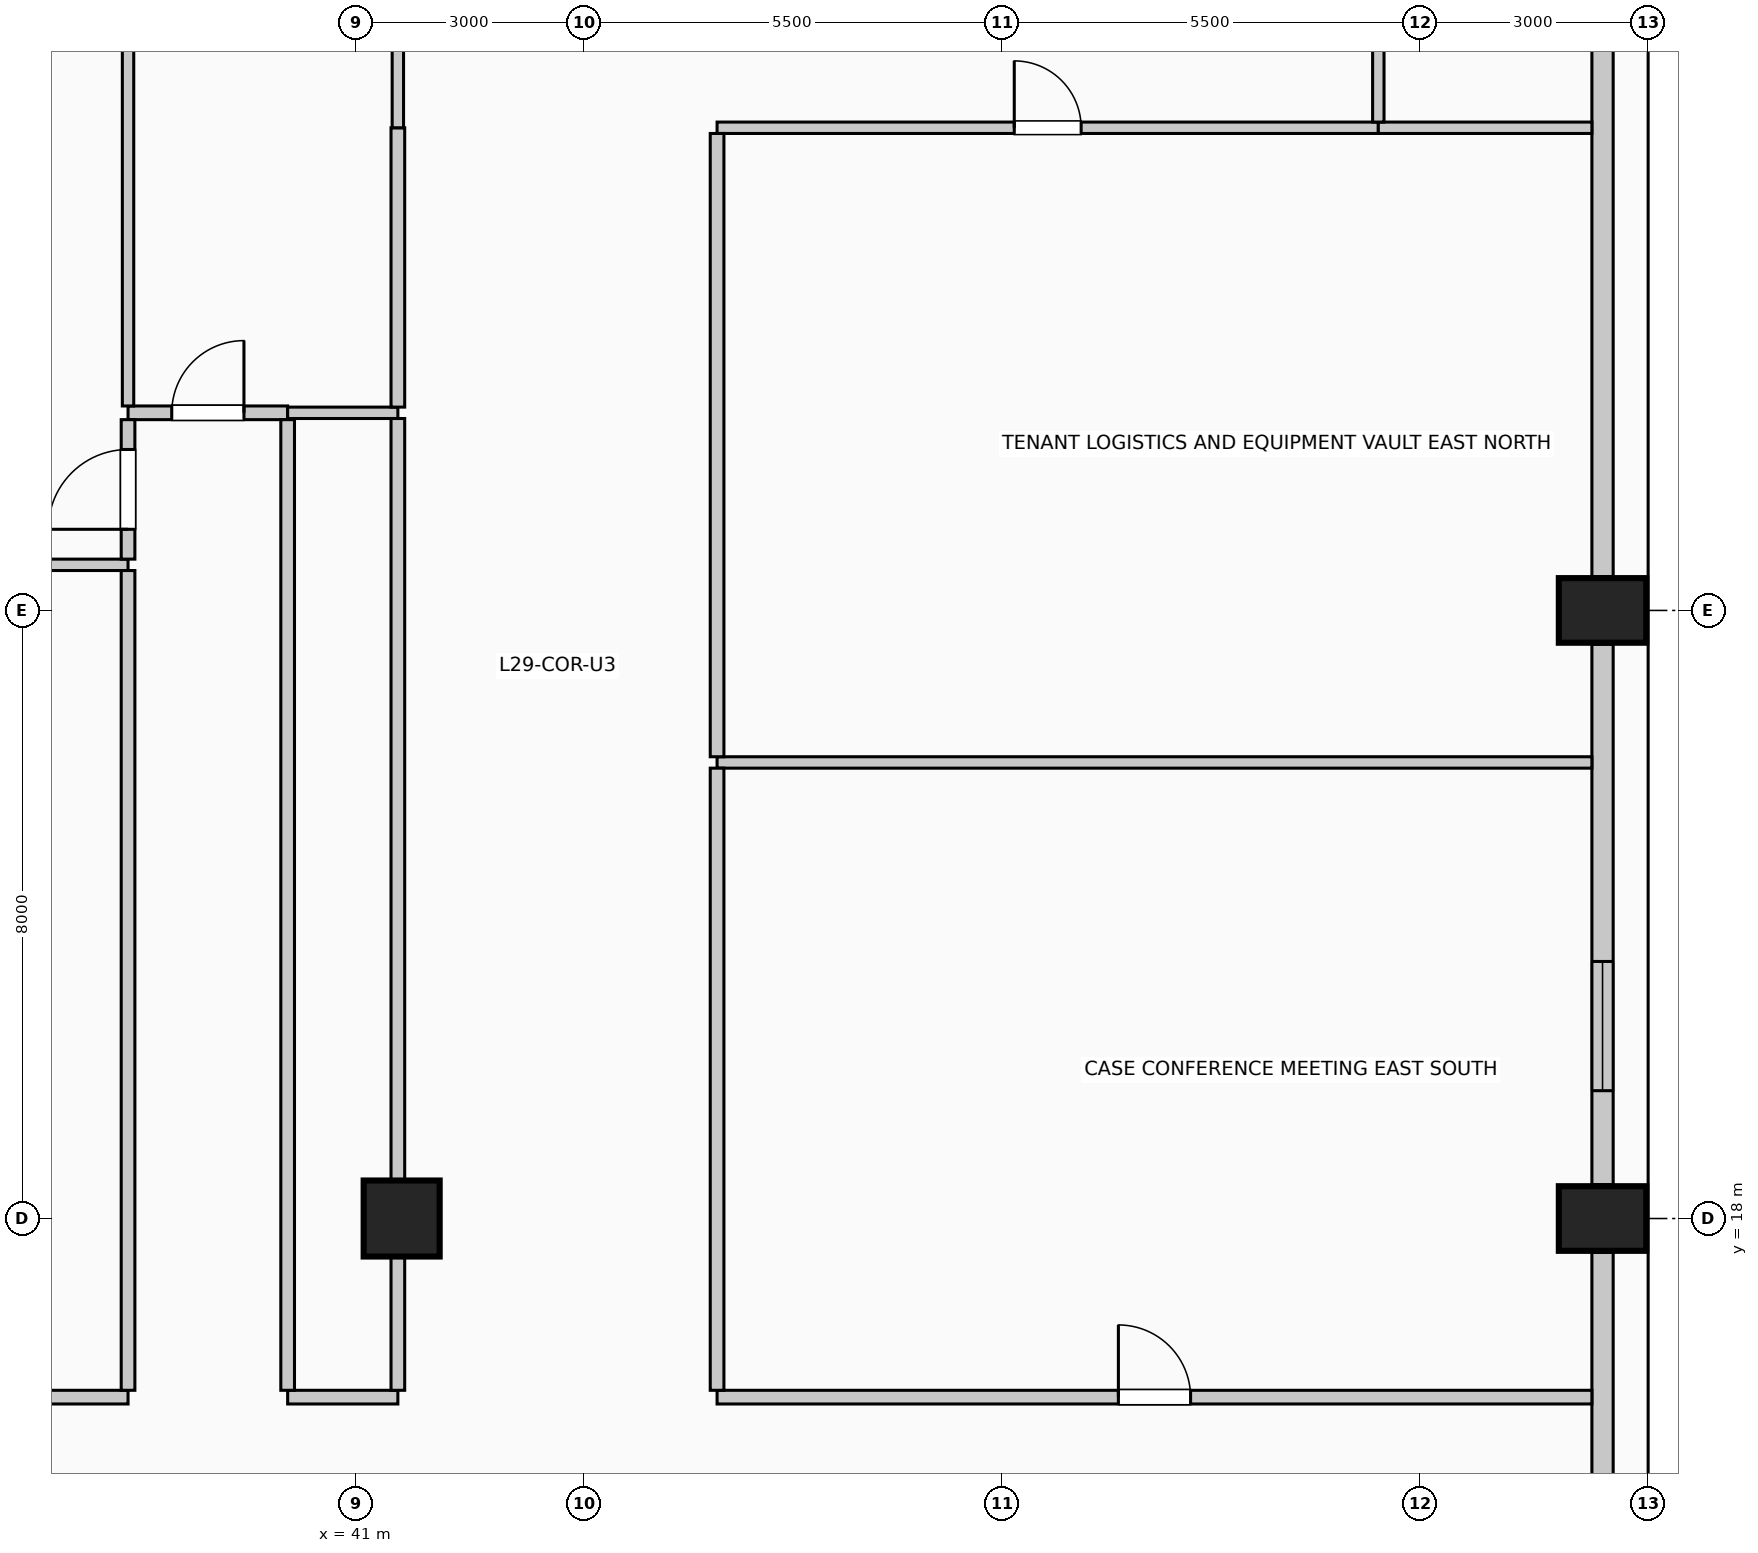
"""IFC4 building model, lengths in metres.
Left out: names, types, materials, properties, quantities, classifications, styles, units other than length and angle.
Written with IfcOpenShell. Run it as: python <this file> out.ifc"""

import sys

from ifc_helpers import new_model, si_unit, direction, frame, frame_2d, origin, origin_2d, place, context, subcontext, project, spatial, rectangle, circle, extrude, element, fill, save


model = new_model("IFC4")
c1 = context("Model", 3, precision=1e-05, world=origin(), true_north=direction((0.0, 1.0)))
c2 = subcontext(c1, "Body", "Model", "MODEL_VIEW")
j1 = project(units=[si_unit("LENGTHUNIT", "METRE"), si_unit("PLANEANGLEUNIT", "RADIAN")], contexts=[c1])
p1 = place(None, origin())
s1 = spatial("IfcSite", under=j1, at=p1, CompositionType="ELEMENT")
p2 = place(p1, origin())
s2 = spatial("IfcBuilding", under=s1, at=p2, CompositionType="ELEMENT")
p3 = place(p2, frame((0.0, 0.0, 120.6)))
s3 = spatial("IfcBuildingStorey", under=s2, at=p3, CompositionType="ELEMENT", Elevation=120.6)
for number, where, z_axis, x_axis in (
    (1, (57.4, 18.0, 0.0), (0.0, 0.0, 1.0), (0.0, 1.0, 0.0)),
    (2, (57.4, 26.0, 0.0), (0.0, 0.0, 1.0), (0.0, 1.0, 0.0)),
):
    element("IfcColumn", number, at=place(p3, frame(where, z_axis=z_axis, x_axis=x_axis)), inside=s3, PredefinedType="COLUMN", context=c2, shape_type="SweptSolid", body=[
        extrude(rectangle(XDim=0.85, YDim=1.15, at=origin_2d()), origin(), (0.0, 0.0, 1.0), 4.0),
    ])
p4 = place(p3, frame((41.6, 18.0, 0.0), z_axis=(0.0, 0.0, 1.0), x_axis=(1.0, 0.0, 0.0)))
e3 = element("IfcColumn", 3, at=p4, inside=s3, PredefinedType="COLUMN", context=c2, shape_type="SweptSolid", body=[
    extrude(circle(Radius=0.5, at=origin_2d()), origin(), (0.0, 0.0, 1.0), 4.0),
])
p5 = place(p3, frame((57.4, 17.555, 0.0), z_axis=(0.0, 0.0, 1.0), x_axis=(0.0, -1.0, 0.0)))
e4 = element("IfcWall", 4, at=p5, inside=s3, PredefinedType="SOLIDWALL", context=c2, shape_type="SweptSolid", body=[
    extrude(rectangle(XDim=7.11, YDim=0.28, at=frame_2d((3.555, 0.0))), origin(), (0.0, 0.0, 1.0), 2.875),
])
p6 = place(p3, frame((57.4, 25.555, 0.0), z_axis=(0.0, 0.0, 1.0), x_axis=(0.0, -1.0, 0.0)))
e5 = element("IfcWall", 5, at=p6, inside=s3, PredefinedType="SOLIDWALL", context=c2, shape_type="SweptSolid", body=[
    extrude(rectangle(XDim=7.11, YDim=0.28, at=frame_2d((3.555, 0.0))), origin(), (0.0, 0.0, 1.0), 2.875),
])
p7 = place(p6, frame((4.173, 0.0, 0.5)))
e6 = element("IfcOpeningElement", 6, at=p7, cuts=e5, PredefinedType="OPENING", context=c2, shape_type="SweptSolid", body=[
    extrude(rectangle(XDim=1.7, YDim=1.95, at=frame_2d((0.85, 0.975))), frame((0.0, 0.15, 0.0), z_axis=(0.0, -1.0, 0.0), x_axis=(1.0, 0.0, 0.0)), (0.0, 0.0, 1.0), 0.3),
])
p8 = place(p3, frame((57.4, 33.555, 0.0), z_axis=(0.0, 0.0, 1.0), x_axis=(0.0, -1.0, 0.0)))
e7 = element("IfcWall", 7, at=p8, inside=s3, PredefinedType="SOLIDWALL", context=c2, shape_type="SweptSolid", body=[
    extrude(rectangle(XDim=7.11, YDim=0.28, at=frame_2d((3.555, 0.0))), origin(), (0.0, 0.0, 1.0), 2.875),
])
p9 = place(p3, frame((16.65, 15.65, 0.0), z_axis=(0.0, 0.0, 1.0), x_axis=(1.0, 0.0, 0.0)))
e8 = element("IfcWall", 8, at=p9, inside=s3, PredefinedType="PARTITIONING", context=c2, shape_type="SweptSolid", body=[
    extrude(rectangle(XDim=21.35, YDim=0.18, at=frame_2d((10.675, 0.0))), origin(), (0.0, 0.0, 1.0), 3.725),
])
p10 = place(p9, frame((10.2, 0.0, 0.0)))
e9 = element("IfcOpeningElement", 9, at=p10, cuts=e8, PredefinedType="OPENING", context=c2, shape_type="SweptSolid", body=[
    extrude(rectangle(XDim=0.95, YDim=2.15, at=frame_2d((0.475, 1.075))), frame((0.0, 0.1, 0.0), z_axis=(0.0, -1.0, 0.0), x_axis=(1.0, 0.0, 0.0)), (0.0, 0.0, 1.0), 0.2),
])
p11 = place(p3, frame((40.1, 15.65, 0.0), z_axis=(0.0, 0.0, 1.0), x_axis=(1.0, 0.0, 0.0)))
e10 = element("IfcWall", 10, at=p11, inside=s3, PredefinedType="PARTITIONING", context=c2, shape_type="SweptSolid", body=[
    extrude(rectangle(XDim=1.45, YDim=0.18, at=frame_2d((0.725, 0.0))), origin(), (0.0, 0.0, 1.0), 3.725),
])
p12 = place(p3, frame((45.75, 15.65, 0.0), z_axis=(0.0, 0.0, 1.0), x_axis=(1.0, 0.0, 0.0)))
e11 = element("IfcWall", 11, at=p12, inside=s3, PredefinedType="PARTITIONING", context=c2, shape_type="SweptSolid", body=[
    extrude(rectangle(XDim=11.51, YDim=0.18, at=frame_2d((5.755, 0.0))), origin(), (0.0, 0.0, 1.0), 3.725),
])
p13 = place(p12, frame((5.28, 0.0, 0.0)))
e12 = element("IfcOpeningElement", 12, at=p13, cuts=e11, PredefinedType="OPENING", context=c2, shape_type="SweptSolid", body=[
    extrude(rectangle(XDim=0.95, YDim=2.15, at=frame_2d((0.475, 1.075))), frame((0.0, 0.1, 0.0), z_axis=(0.0, -1.0, 0.0), x_axis=(1.0, 0.0, 0.0)), (0.0, 0.0, 1.0), 0.2),
])
p14 = place(p3, frame((45.75, 24.0, 0.0), z_axis=(0.0, 0.0, 1.0), x_axis=(1.0, 0.0, 0.0)))
e13 = element("IfcWall", 13, at=p14, inside=s3, PredefinedType="PARTITIONING", context=c2, shape_type="SweptSolid", body=[
    extrude(rectangle(XDim=11.51, YDim=0.15, at=frame_2d((5.755, 0.0))), origin(), (0.0, 0.0, 1.0), 3.725),
])
p15 = place(p3, frame((16.65, 26.6, 0.0), z_axis=(0.0, 0.0, 1.0), x_axis=(1.0, 0.0, 0.0)))
e14 = element("IfcWall", 14, at=p15, inside=s3, PredefinedType="PARTITIONING", context=c2, shape_type="SweptSolid", body=[
    extrude(rectangle(XDim=21.35, YDim=0.15, at=frame_2d((10.675, 0.0))), origin(), (0.0, 0.0, 1.0), 3.725),
])
p16 = place(p3, frame((38.0, 28.6, 0.0), z_axis=(0.0, 0.0, 1.0), x_axis=(1.0, 0.0, 0.0)))
e15 = element("IfcWall", 15, at=p16, inside=s3, PredefinedType="PARTITIONING", context=c2, shape_type="SweptSolid", body=[
    extrude(rectangle(XDim=2.1, YDim=0.18, at=frame_2d((1.05, 0.0))), origin(), (0.0, 0.0, 1.0), 3.725),
])
p17 = place(p16, frame((0.575, 0.0, 0.0)))
e16 = element("IfcOpeningElement", 16, at=p17, cuts=e15, PredefinedType="OPENING", context=c2, shape_type="SweptSolid", body=[
    extrude(rectangle(XDim=0.95, YDim=2.15, at=frame_2d((0.475, 1.075))), frame((0.0, 0.1, 0.0), z_axis=(0.0, -1.0, 0.0), x_axis=(1.0, 0.0, 0.0)), (0.0, 0.0, 1.0), 0.2),
])
p18 = place(p3, frame((40.1, 28.6, 0.0), z_axis=(0.0, 0.0, 1.0), x_axis=(1.0, 0.0, 0.0)))
e17 = element("IfcWall", 17, at=p18, inside=s3, PredefinedType="PARTITIONING", context=c2, shape_type="SweptSolid", body=[
    extrude(rectangle(XDim=1.45, YDim=0.15, at=frame_2d((0.725, 0.0))), origin(), (0.0, 0.0, 1.0), 3.725),
])
p19 = place(p3, frame((45.75, 32.35, 0.0), z_axis=(0.0, 0.0, 1.0), x_axis=(1.0, 0.0, 0.0)))
e18 = element("IfcWall", 18, at=p19, inside=s3, PredefinedType="PARTITIONING", context=c2, shape_type="SweptSolid", body=[
    extrude(rectangle(XDim=8.7, YDim=0.15, at=frame_2d((4.35, 0.0))), origin(), (0.0, 0.0, 1.0), 3.725),
])
p20 = place(p19, frame((3.91, 0.0, 0.0)))
e19 = element("IfcOpeningElement", 19, at=p20, cuts=e18, PredefinedType="OPENING", context=c2, shape_type="SweptSolid", body=[
    extrude(rectangle(XDim=0.88, YDim=2.1, at=frame_2d((0.44, 1.05))), frame((0.0, 0.085, 0.0), z_axis=(0.0, -1.0, 0.0), x_axis=(1.0, 0.0, 0.0)), (0.0, 0.0, 1.0), 0.17),
])
p21 = place(p3, frame((54.45, 32.35, 0.0), z_axis=(0.0, 0.0, 1.0), x_axis=(1.0, 0.0, 0.0)))
e20 = element("IfcWall", 20, at=p21, inside=s3, PredefinedType="PARTITIONING", context=c2, shape_type="SweptSolid", body=[
    extrude(rectangle(XDim=2.81, YDim=0.15, at=frame_2d((1.405, 0.0))), origin(), (0.0, 0.0, 1.0), 3.725),
])
p22 = place(p3, frame((38.0, 15.74, 0.0), z_axis=(0.0, 0.0, 1.0), x_axis=(0.0, 1.0, 0.0)))
e21 = element("IfcWall", 21, at=p22, inside=s3, PredefinedType="PARTITIONING", context=c2, shape_type="SweptSolid", body=[
    extrude(rectangle(XDim=10.785, YDim=0.18, at=frame_2d((5.393, 0.0))), origin(), (0.0, 0.0, 1.0), 3.725),
])
p23 = place(p3, frame((38.0, 26.675, 0.0), z_axis=(0.0, 0.0, 1.0), x_axis=(0.0, 1.0, 0.0)))
e22 = element("IfcWall", 22, at=p23, inside=s3, PredefinedType="PARTITIONING", context=c2, shape_type="SweptSolid", body=[
    extrude(rectangle(XDim=1.835, YDim=0.18, at=frame_2d((0.917, 0.0))), origin(), (0.0, 0.0, 1.0), 3.725),
])
p24 = place(p23, frame((0.393, 0.0, 0.0)))
e23 = element("IfcOpeningElement", 23, at=p24, cuts=e22, PredefinedType="OPENING", context=c2, shape_type="SweptSolid", body=[
    extrude(rectangle(XDim=1.05, YDim=2.15, at=frame_2d((0.525, 1.075))), frame((0.0, 0.1, 0.0), z_axis=(0.0, -1.0, 0.0), x_axis=(1.0, 0.0, 0.0)), (0.0, 0.0, 1.0), 0.2),
])
p25 = place(p3, frame((38.0, 28.69, 0.0), z_axis=(0.0, 0.0, 1.0), x_axis=(0.0, 1.0, 0.0)))
e24 = element("IfcWall", 24, at=p25, inside=s3, PredefinedType="PARTITIONING", context=c2, shape_type="SweptSolid", body=[
    extrude(rectangle(XDim=16.57, YDim=0.15, at=frame_2d((8.285, 0.0))), origin(), (0.0, 0.0, 1.0), 3.725),
])
p26 = place(p3, frame((40.1, 15.74, 0.0), z_axis=(0.0, 0.0, 1.0), x_axis=(0.0, 1.0, 0.0)))
e25 = element("IfcWall", 25, at=p26, inside=s3, PredefinedType="PARTITIONING", context=c2, shape_type="SweptSolid", body=[
    extrude(rectangle(XDim=12.77, YDim=0.18, at=frame_2d((6.385, 0.0))), origin(), (0.0, 0.0, 1.0), 3.725),
])
p27 = place(p3, frame((41.55, 15.74, 0.0), z_axis=(0.0, 0.0, 1.0), x_axis=(0.0, 1.0, 0.0)))
e26 = element("IfcWall", 26, at=p27, inside=s3, PredefinedType="PARTITIONING", context=c2, shape_type="SweptSolid", body=[
    extrude(rectangle(XDim=1.76, YDim=0.18, at=frame_2d((0.88, 0.0))), origin(), (0.0, 0.0, 1.0), 3.07),
])
p28 = place(p3, frame((41.55, 18.5, 0.0), z_axis=(0.0, 0.0, 1.0), x_axis=(0.0, 1.0, 0.0)))
e27 = element("IfcWall", 27, at=p28, inside=s3, PredefinedType="PARTITIONING", context=c2, shape_type="SweptSolid", body=[
    extrude(rectangle(XDim=10.025, YDim=0.18, at=frame_2d((5.012, 0.0))), origin(), (0.0, 0.0, 1.0), 3.07),
])
p29 = place(p3, frame((41.55, 28.675, 0.0), z_axis=(0.0, 0.0, 1.0), x_axis=(0.0, 1.0, 0.0)))
e28 = element("IfcWall", 28, at=p29, inside=s3, PredefinedType="PARTITIONING", context=c2, shape_type="SweptSolid", body=[
    extrude(rectangle(XDim=3.675, YDim=0.18, at=frame_2d((1.837, 0.0))), origin(), (0.0, 0.0, 1.0), 3.07),
])
p30 = place(p3, frame((41.55, 32.35, 0.0), z_axis=(0.0, 0.0, 1.0), x_axis=(0.0, 1.0, 0.0)))
e29 = element("IfcWall", 29, at=p30, inside=s3, PredefinedType="PARTITIONING", context=c2, shape_type="SweptSolid", body=[
    extrude(rectangle(XDim=1.15, YDim=0.15, at=frame_2d((0.575, 0.0))), origin(), (0.0, 0.0, 1.0), 3.07),
])
p31 = place(p3, frame((45.75, 15.74, 0.0), z_axis=(0.0, 0.0, 1.0), x_axis=(0.0, 1.0, 0.0)))
e30 = element("IfcWall", 30, at=p31, inside=s3, PredefinedType="PARTITIONING", context=c2, shape_type="SweptSolid", body=[
    extrude(rectangle(XDim=8.185, YDim=0.18, at=frame_2d((4.093, 0.0))), origin(), (0.0, 0.0, 1.0), 3.725),
])
p32 = place(p3, frame((45.75, 24.075, 0.0), z_axis=(0.0, 0.0, 1.0), x_axis=(0.0, 1.0, 0.0)))
e31 = element("IfcWall", 31, at=p32, inside=s3, PredefinedType="PARTITIONING", context=c2, shape_type="SweptSolid", body=[
    extrude(rectangle(XDim=8.2, YDim=0.18, at=frame_2d((4.1, 0.0))), origin(), (0.0, 0.0, 1.0), 3.725),
])
p33 = place(p3, frame((54.45, 32.425, 0.0), z_axis=(0.0, 0.0, 1.0), x_axis=(0.0, 1.0, 0.0)))
e32 = element("IfcWall", 32, at=p33, inside=s3, PredefinedType="PARTITIONING", context=c2, shape_type="SweptSolid", body=[
    extrude(rectangle(XDim=1.725, YDim=0.15, at=frame_2d((0.862, 0.0))), origin(), (0.0, 0.0, 1.0), 3.725),
])
p34 = place(p7, origin())
e33 = element("IfcWindow", 33, at=p34, inside=s3, PartitioningType="SINGLE_PANEL", PredefinedType="WINDOW", context=c2, shape_type="SweptSolid", body=[
    extrude(rectangle(XDim=1.7, YDim=1.95, at=frame_2d((0.85, 0.975))), frame((0.0, 0.03, 0.0), z_axis=(0.0, -1.0, 0.0), x_axis=(1.0, 0.0, 0.0)), (0.0, 0.0, 1.0), 0.06),
])
fill(e6, e33)
p35 = place(p13, origin())
e34 = element("IfcDoor", 34, at=p35, inside=s3, OperationType="SINGLE_SWING_LEFT", PredefinedType="DOOR", context=c2, shape_type="SweptSolid", body=[
    extrude(rectangle(XDim=0.95, YDim=2.15, at=frame_2d((0.475, 1.075))), frame((0.0, 0.025, 0.0), z_axis=(0.0, -1.0, 0.0), x_axis=(1.0, 0.0, 0.0)), (0.0, 0.0, 1.0), 0.05),
])
fill(e12, e34)
p36 = place(p17, origin())
e35 = element("IfcDoor", 35, at=p36, inside=s3, OperationType="SINGLE_SWING_RIGHT", PredefinedType="DOOR", context=c2, shape_type="SweptSolid", body=[
    extrude(rectangle(XDim=0.95, YDim=2.15, at=frame_2d((0.475, 1.075))), frame((0.0, 0.025, 0.0), z_axis=(0.0, -1.0, 0.0), x_axis=(1.0, 0.0, 0.0)), (0.0, 0.0, 1.0), 0.05),
])
fill(e16, e35)
p37 = place(p20, origin())
e36 = element("IfcDoor", 36, at=p37, inside=s3, OperationType="SINGLE_SWING_LEFT", PredefinedType="DOOR", context=c2, shape_type="SweptSolid", body=[
    extrude(rectangle(XDim=0.88, YDim=2.1, at=frame_2d((0.44, 1.05))), frame((0.0, 0.025, 0.0), z_axis=(0.0, -1.0, 0.0), x_axis=(1.0, 0.0, 0.0)), (0.0, 0.0, 1.0), 0.05),
])
fill(e19, e36)
p38 = place(p24, origin())
e37 = element("IfcDoor", 37, at=p38, inside=s3, OperationType="SINGLE_SWING_LEFT", PredefinedType="DOOR", context=c2, shape_type="SweptSolid", body=[
    extrude(rectangle(XDim=1.05, YDim=2.15, at=frame_2d((0.525, 1.075))), frame((0.0, 0.025, 0.0), z_axis=(0.0, -1.0, 0.0), x_axis=(1.0, 0.0, 0.0)), (0.0, 0.0, 1.0), 0.05),
])
fill(e23, e37)
save(model, sys.argv[1])
